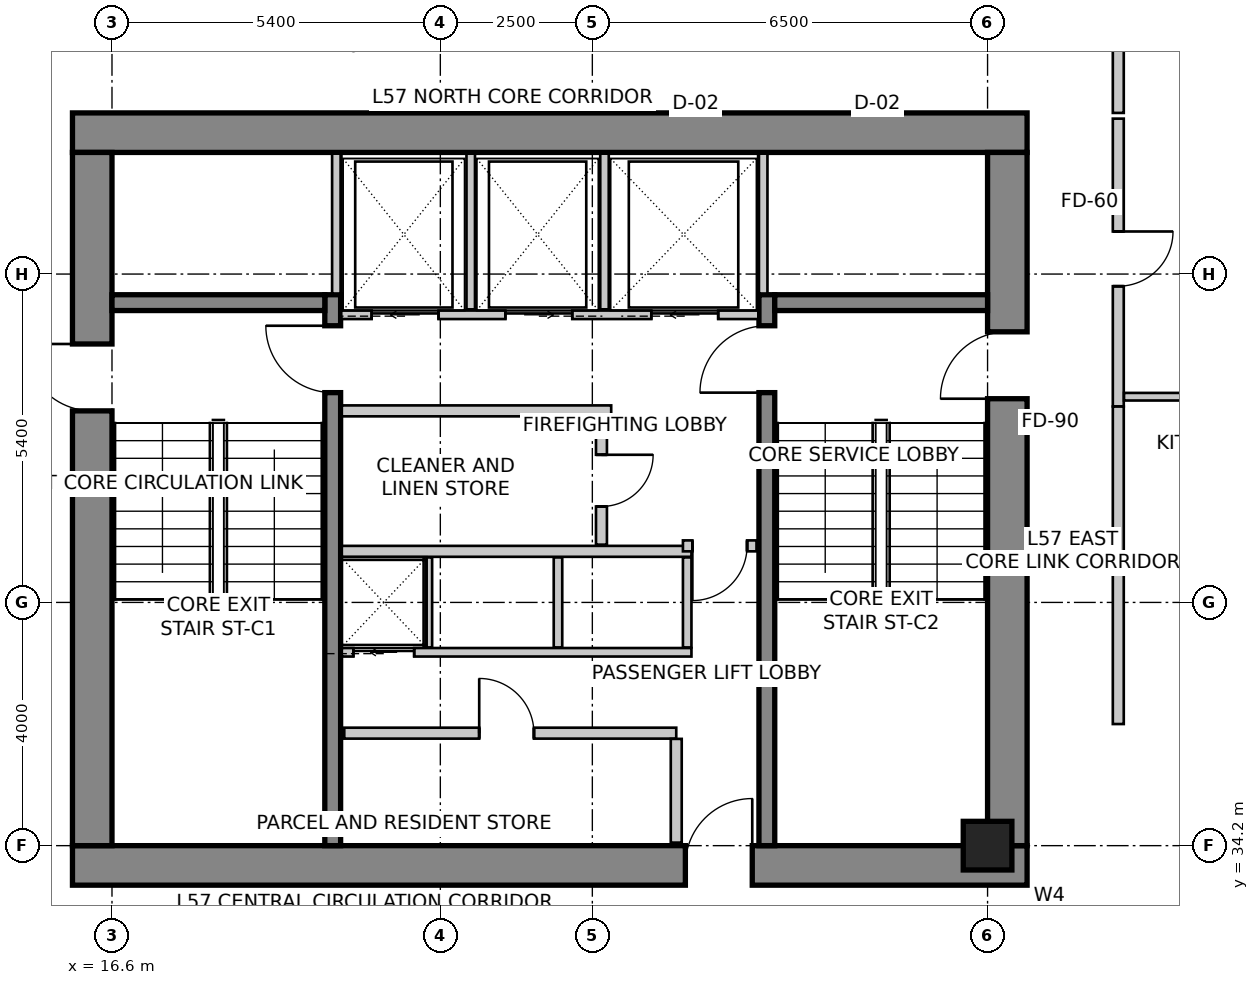
"""IFC4 building model, lengths in metres.
Left out: names, types, materials, properties, quantities, classifications, styles, units other than length and angle.
Written with IfcOpenShell. Run it as: python <this file> out.ifc"""

import sys

from ifc_helpers import new_model, si_unit, direction, frame, frame_2d, origin, origin_2d, place, context, subcontext, project, spatial, rectangle, extrude, source, transform, mapped, element, fill, save


model = new_model("IFC4")
c1 = context("Model", 3, precision=1e-05, world=origin(), true_north=direction((0.0, 1.0)))
c2 = subcontext(c1, "Body", "Model", "MODEL_VIEW")
j1 = project(units=[si_unit("LENGTHUNIT", "METRE"), si_unit("PLANEANGLEUNIT", "RADIAN")], contexts=[c1])
p1 = place(None, origin())
s1 = spatial("IfcSite", under=j1, at=p1, CompositionType="ELEMENT")
p2 = place(p1, origin())
s2 = spatial("IfcBuilding", under=s1, at=p2, CompositionType="ELEMENT")
p3 = place(p2, frame((0.0, 0.0, 225.4)))
s3 = spatial("IfcBuildingStorey", under=s2, at=p3, CompositionType="ELEMENT", Elevation=225.4)
p4 = place(p3, frame((15.95, 45.925, 0.0), z_axis=(0.0, 0.0, 1.0), x_axis=(1.0, 0.0, 0.0)))
e1 = element("IfcWall", 1, at=p4, inside=s3, PredefinedType="SHEAR", context=c2, shape_type="SweptSolid", body=[
    extrude(rectangle(XDim=15.7, YDim=0.65, at=frame_2d((7.85, 0.0))), origin(), (0.0, 0.0, 1.0), 3.5),
])
p5 = place(p3, frame((15.95, 33.875, 0.0), z_axis=(0.0, 0.0, 1.0), x_axis=(1.0, 0.0, 0.0)))
e2 = element("IfcWall", 2, at=p5, inside=s3, PredefinedType="SHEAR", context=c2, shape_type="SweptSolid", body=[
    extrude(rectangle(XDim=15.7, YDim=0.65, at=frame_2d((7.85, 0.0))), origin(), (0.0, 0.0, 1.0), 3.5),
])
m1 = source(origin(), c2, "Body", "SweptSolid", [
    extrude(rectangle(XDim=1.1, YDim=2.15, at=frame_2d((0.55, 1.075))), frame((0.0, 0.335, 0.0), z_axis=(0.0, -1.0, 0.0), x_axis=(1.0, 0.0, 0.0)), (0.0, 0.0, 1.0), 0.67),
])
p6 = place(p5, frame((10.08, 0.0, 0.0)))
e3 = element("IfcOpeningElement", 3, at=p6, cuts=e2, PredefinedType="OPENING", context=c2, shape_type="MappedRepresentation", body=[
    mapped(m1, transform((0.0, 0.0, 0.0), scale=1.0)),
])
p7 = place(p3, frame((16.275, 34.2, 0.0), z_axis=(0.0, 0.0, 1.0), x_axis=(0.0, 1.0, 0.0)))
e4 = element("IfcWall", 4, at=p7, inside=s3, PredefinedType="SHEAR", context=c2, shape_type="SweptSolid", body=[
    extrude(rectangle(XDim=11.4, YDim=0.65, at=frame_2d((5.7, 0.0))), origin(), (0.0, 0.0, 1.0), 3.5),
])
p8 = place(p7, frame((7.15, 0.0, 0.0)))
e5 = element("IfcOpeningElement", 5, at=p8, cuts=e4, PredefinedType="OPENING", context=c2, shape_type="MappedRepresentation", body=[
    mapped(m1, transform((0.0, 0.0, 0.0), scale=1.0)),
])
p9 = place(p3, frame((31.325, 34.2, 0.0), z_axis=(0.0, 0.0, 1.0), x_axis=(0.0, 1.0, 0.0)))
e6 = element("IfcWall", 6, at=p9, inside=s3, PredefinedType="SHEAR", context=c2, shape_type="SweptSolid", body=[
    extrude(rectangle(XDim=11.4, YDim=0.65, at=frame_2d((5.7, 0.0))), origin(), (0.0, 0.0, 1.0), 3.5),
])
p10 = place(p9, frame((7.35, 0.0, 0.0)))
e7 = element("IfcOpeningElement", 7, at=p10, cuts=e6, PredefinedType="OPENING", context=c2, shape_type="MappedRepresentation", body=[
    mapped(m1, transform((0.0, 0.0, 0.0), scale=1.0)),
])
p11 = place(p3, frame((20.23, 34.2, 0.0), z_axis=(0.0, 0.0, 1.0), x_axis=(0.0, 1.0, 0.0)))
e8 = element("IfcWall", 8, at=p11, inside=s3, PredefinedType="SHEAR", context=c2, shape_type="SweptSolid", body=[
    extrude(rectangle(XDim=9.06, YDim=0.26, at=frame_2d((4.53, 0.0))), origin(), (0.0, 0.0, 1.0), 3.5),
])
m2 = source(origin(), c2, "Body", "SweptSolid", [
    extrude(rectangle(XDim=1.1, YDim=2.15, at=frame_2d((0.55, 1.075))), frame((0.0, 0.14, 0.0), z_axis=(0.0, -1.0, 0.0), x_axis=(1.0, 0.0, 0.0)), (0.0, 0.0, 1.0), 0.28),
])
p12 = place(p11, frame((7.45, 0.0, 0.0)))
e9 = element("IfcOpeningElement", 9, at=p12, cuts=e8, PredefinedType="OPENING", context=c2, shape_type="MappedRepresentation", body=[
    mapped(m2, transform((0.0, 0.0, 0.0), scale=1.0)),
])
p13 = place(p3, frame((27.37, 34.2, 0.0), z_axis=(0.0, 0.0, 1.0), x_axis=(0.0, 1.0, 0.0)))
e10 = element("IfcWall", 10, at=p13, inside=s3, PredefinedType="SHEAR", context=c2, shape_type="SweptSolid", body=[
    extrude(rectangle(XDim=9.06, YDim=0.26, at=frame_2d((4.53, 0.0))), origin(), (0.0, 0.0, 1.0), 3.5),
])
p14 = place(p13, frame((7.45, 0.0, 0.0)))
e11 = element("IfcOpeningElement", 11, at=p14, cuts=e10, PredefinedType="OPENING", context=c2, shape_type="MappedRepresentation", body=[
    mapped(m2, transform((0.0, 0.0, 0.0), scale=1.0)),
])
for number, where, z_axis, x_axis in (
    (12, (16.6, 43.13, 0.0), (0.0, 0.0, 1.0), (1.0, 0.0, 0.0)),
    (13, (27.5, 43.13, 0.0), (0.0, 0.0, 1.0), (1.0, 0.0, 0.0)),
):
    element("IfcWall", number, at=place(p3, frame(where, z_axis=z_axis, x_axis=x_axis)), inside=s3, PredefinedType="SHEAR", context=c2, shape_type="SweptSolid", body=[
        extrude(rectangle(XDim=3.5, YDim=0.26, at=frame_2d((1.75, 0.0))), origin(), (0.0, 0.0, 1.0), 3.5),
    ])
m3 = source(origin(), c2, "Body", "SweptSolid", [
    extrude(rectangle(XDim=0.8, YDim=0.8, at=origin_2d()), origin(), (0.0, 0.0, 1.0), 3.5),
])
p15 = place(p3, frame((31.0, 34.2, 0.0), z_axis=(0.0, 0.0, 1.0), x_axis=(1.0, 0.0, 0.0)))
e14 = element("IfcColumn", 14, at=p15, inside=s3, PredefinedType="COLUMN", context=c2, shape_type="MappedRepresentation", body=[
    mapped(m3, transform((0.0, 0.0, 0.0), scale=1.0)),
])
p16 = place(p3, frame((21.874, 52.742, 0.0), z_axis=(0.0, 0.0, 1.0), x_axis=(-0.84365659959, -0.536883173482, 0.0)))
e15 = element("IfcWall", 15, at=p16, inside=s3, PredefinedType="SOLIDWALL", context=c2, shape_type="SweptSolid", body=[
    extrude(rectangle(XDim=10.283, YDim=0.3, at=frame_2d((5.142, 0.0))), origin(), (0.0, 0.0, 1.0), 3.25),
])
m4 = source(origin(), c2, "Body", "SweptSolid", [
    extrude(rectangle(XDim=2.4, YDim=2.2, at=frame_2d((1.2, 1.1))), frame((0.0, 0.16, 0.0), z_axis=(0.0, -1.0, 0.0), x_axis=(1.0, 0.0, 0.0)), (0.0, 0.0, 1.0), 0.32),
])
p17 = place(p16, frame((3.307, 0.0, 0.85)))
e16 = element("IfcOpeningElement", 16, at=p17, cuts=e15, PredefinedType="OPENING", context=c2, shape_type="MappedRepresentation", body=[
    mapped(m4, transform((0.0, 0.0, 0.0), scale=1.0)),
])
p18 = place(p3, frame((20.37, 42.93, 0.0), z_axis=(0.0, 0.0, 1.0), x_axis=(1.0, 0.0, 0.0)))
e17 = element("IfcWall", 17, at=p18, inside=s3, PredefinedType="SOLIDWALL", context=c2, shape_type="SweptSolid", body=[
    extrude(rectangle(XDim=6.86, YDim=0.14, at=frame_2d((3.43, 0.0))), origin(), (0.0, 0.0, 1.0), 3.25),
])
m5 = source(origin(), c2, "Body", "SweptSolid", [
    extrude(rectangle(XDim=1.1, YDim=2.15, at=frame_2d((0.55, 1.075))), frame((0.0, 0.08, 0.0), z_axis=(0.0, -1.0, 0.0), x_axis=(1.0, 0.0, 0.0)), (0.0, 0.0, 1.0), 0.16),
])
p19 = place(p18, frame((0.5, 0.0, 0.0)))
e18 = element("IfcOpeningElement", 18, at=p19, cuts=e17, PredefinedType="OPENING", context=c2, shape_type="MappedRepresentation", body=[
    mapped(m5, transform((0.0, 0.0, 0.0), scale=1.0)),
])
p20 = place(p18, frame((2.7, 0.0, 0.0)))
e19 = element("IfcOpeningElement", 19, at=p20, cuts=e17, PredefinedType="OPENING", context=c2, shape_type="MappedRepresentation", body=[
    mapped(m5, transform((0.0, 0.0, 0.0), scale=1.0)),
])
p21 = place(p18, frame((5.1, 0.0, 0.0)))
e20 = element("IfcOpeningElement", 20, at=p21, cuts=e17, PredefinedType="OPENING", context=c2, shape_type="MappedRepresentation", body=[
    mapped(m5, transform((0.0, 0.0, 0.0), scale=1.0)),
])
for number, where, z_axis, x_axis in (
    (21, (20.29, 43.28, 0.0), (0.0, 0.0, 1.0), (0.0, 1.0, 0.0)),
    (22, (27.31, 43.28, 0.0), (0.0, 0.0, 1.0), (0.0, 1.0, 0.0)),
):
    element("IfcWall", number, at=place(p3, frame(where, z_axis=z_axis, x_axis=x_axis)), inside=s3, PredefinedType="SOLIDWALL", context=c2, shape_type="SweptSolid", body=[
        extrude(rectangle(XDim=2.3, YDim=0.14, at=frame_2d((1.15, 0.0))), origin(), (0.0, 0.0, 1.0), 3.25),
    ])
for number, where, z_axis, x_axis in (
    (23, (22.5, 43.02, 0.0), (0.0, 0.0, 1.0), (0.0, 1.0, 0.0)),
    (24, (24.7, 43.02, 0.0), (0.0, 0.0, 1.0), (0.0, 1.0, 0.0)),
):
    element("IfcWall", number, at=place(p3, frame(where, z_axis=z_axis, x_axis=x_axis)), inside=s3, PredefinedType="SOLIDWALL", context=c2, shape_type="SweptSolid", body=[
        extrude(rectangle(XDim=2.56, YDim=0.14, at=frame_2d((1.28, 0.0))), origin(), (0.0, 0.0, 1.0), 3.25),
    ])
p22 = place(p3, frame((20.38, 37.38, 0.0), z_axis=(0.0, 0.0, 1.0), x_axis=(1.0, 0.0, 0.0)))
e25 = element("IfcWall", 25, at=p22, inside=s3, PredefinedType="SOLIDWALL", context=c2, shape_type="SweptSolid", body=[
    extrude(rectangle(XDim=5.75, YDim=0.14, at=frame_2d((2.875, 0.0))), origin(), (0.0, 0.0, 1.0), 3.25),
])
m6 = source(origin(), c2, "Body", "SweptSolid", [
    extrude(rectangle(XDim=1.0, YDim=2.15, at=frame_2d((0.5, 1.075))), frame((0.0, 0.08, 0.0), z_axis=(0.0, -1.0, 0.0), x_axis=(1.0, 0.0, 0.0)), (0.0, 0.0, 1.0), 0.16),
])
p23 = place(p22, frame((0.19, 0.0, 0.0)))
e26 = element("IfcOpeningElement", 26, at=p23, cuts=e25, PredefinedType="OPENING", context=c2, shape_type="MappedRepresentation", body=[
    mapped(m6, transform((0.0, 0.0, 0.0), scale=1.0)),
])
p24 = place(p3, frame((20.38, 39.04, 0.0), z_axis=(0.0, 0.0, 1.0), x_axis=(1.0, 0.0, 0.0)))
e27 = element("IfcWall", 27, at=p24, inside=s3, PredefinedType="SOLIDWALL", context=c2, shape_type="SweptSolid", body=[
    extrude(rectangle(XDim=5.75, YDim=0.18, at=frame_2d((2.875, 0.0))), origin(), (0.0, 0.0, 1.0), 3.25),
])
for number, where, z_axis, x_axis in (
    (28, (26.06, 37.46, 0.0), (0.0, 0.0, 1.0), (0.0, 1.0, 0.0)),
    (29, (21.795, 37.46, 0.0), (0.0, 0.0, 1.0), (0.0, 1.0, 0.0)),
    (30, (23.935, 37.46, 0.0), (0.0, 0.0, 1.0), (0.0, 1.0, 0.0)),
):
    element("IfcWall", number, at=place(p3, frame(where, z_axis=z_axis, x_axis=x_axis)), inside=s3, PredefinedType="SOLIDWALL", context=c2, shape_type="SweptSolid", body=[
        extrude(rectangle(XDim=1.48, YDim=0.14, at=frame_2d((0.74, 0.0))), origin(), (0.0, 0.0, 1.0), 3.25),
    ])
p25 = place(p3, frame((24.81, 41.35, 0.0), z_axis=(0.0, 0.0, 1.0), x_axis=(-1.0, 0.0, 0.0)))
e31 = element("IfcWall", 31, at=p25, inside=s3, PredefinedType="PARTITIONING", context=c2, shape_type="SweptSolid", body=[
    extrude(rectangle(XDim=4.43, YDim=0.18, at=frame_2d((2.215, 0.0))), origin(), (0.0, 0.0, 1.0), 3.25),
])
p26 = place(p3, frame((24.65, 41.256, 0.0), z_axis=(0.0, 0.0, 1.0), x_axis=(0.0, -1.0, 0.0)))
e32 = element("IfcWall", 32, at=p26, inside=s3, PredefinedType="PARTITIONING", context=c2, shape_type="SweptSolid", body=[
    extrude(rectangle(XDim=2.106, YDim=0.18, at=frame_2d((1.053, 0.0))), origin(), (0.0, 0.0, 1.0), 3.25),
])
m7 = source(origin(), c2, "Body", "SweptSolid", [
    extrude(rectangle(XDim=0.85, YDim=2.15, at=frame_2d((0.425, 1.075))), frame((0.0, 0.1, 0.0), z_axis=(0.0, -1.0, 0.0), x_axis=(1.0, 0.0, 0.0)), (0.0, 0.0, 1.0), 0.2),
])
p27 = place(p26, frame((0.628, 0.0, 0.0)))
e33 = element("IfcOpeningElement", 33, at=p27, cuts=e32, PredefinedType="OPENING", context=c2, shape_type="MappedRepresentation", body=[
    mapped(m7, transform((0.0, 0.0, 0.0), scale=1.0)),
])
p28 = place(p3, frame((27.2, 39.13, 0.0), z_axis=(0.0, 0.0, 1.0), x_axis=(-1.0, 0.0, 0.0)))
e34 = element("IfcWall", 34, at=p28, inside=s3, PredefinedType="PARTITIONING", context=c2, shape_type="SweptSolid", body=[
    extrude(rectangle(XDim=1.21, YDim=0.18, at=frame_2d((0.605, 0.0))), origin(), (0.0, 0.0, 1.0), 3.25),
])
m8 = source(origin(), c2, "Body", "SweptSolid", [
    extrude(rectangle(XDim=0.9, YDim=2.15, at=frame_2d((0.45, 1.075))), frame((0.0, 0.1, 0.0), z_axis=(0.0, -1.0, 0.0), x_axis=(1.0, 0.0, 0.0)), (0.0, 0.0, 1.0), 0.2),
])
p29 = place(p28, frame((0.155, 0.0, 0.0)))
e35 = element("IfcOpeningElement", 35, at=p29, cuts=e34, PredefinedType="OPENING", context=c2, shape_type="MappedRepresentation", body=[
    mapped(m8, transform((0.0, 0.0, 0.0), scale=1.0)),
])
p30 = place(p3, frame((20.42, 36.05, 0.0), z_axis=(0.0, 0.0, 1.0), x_axis=(1.0, 0.0, 0.0)))
e36 = element("IfcWall", 36, at=p30, inside=s3, PredefinedType="PARTITIONING", context=c2, shape_type="SweptSolid", body=[
    extrude(rectangle(XDim=5.46, YDim=0.18, at=frame_2d((2.73, 0.0))), origin(), (0.0, 0.0, 1.0), 3.25),
])
p31 = place(p30, frame((2.219, 0.0, 0.0)))
e37 = element("IfcOpeningElement", 37, at=p31, cuts=e36, PredefinedType="OPENING", context=c2, shape_type="MappedRepresentation", body=[
    mapped(m8, transform((0.0, 0.0, 0.0), scale=1.0)),
])
p32 = place(p3, frame((25.88, 35.956, 0.0), z_axis=(0.0, 0.0, 1.0), x_axis=(0.0, -1.0, 0.0)))
e38 = element("IfcWall", 38, at=p32, inside=s3, PredefinedType="PARTITIONING", context=c2, shape_type="SweptSolid", body=[
    extrude(rectangle(XDim=1.706, YDim=0.18, at=frame_2d((0.853, 0.0))), origin(), (0.0, 0.0, 1.0), 2.542),
])
p33 = place(p3, frame((33.15, 47.706, 0.0), z_axis=(0.0, 0.0, 1.0), x_axis=(0.0, -1.0, 0.0)))
e39 = element("IfcWall", 39, at=p33, inside=s3, PredefinedType="PARTITIONING", context=c2, shape_type="SweptSolid", body=[
    extrude(rectangle(XDim=1.456, YDim=0.18, at=frame_2d((0.728, 0.0))), origin(), (0.0, 0.0, 1.0), 2.835),
])
p34 = place(p3, frame((33.15, 38.948, 0.0), z_axis=(0.0, 0.0, 1.0), x_axis=(0.0, -1.0, 0.0)))
e40 = element("IfcWall", 40, at=p34, inside=s3, PredefinedType="PARTITIONING", context=c2, shape_type="SweptSolid", body=[
    extrude(rectangle(XDim=2.748, YDim=0.18, at=frame_2d((1.374, 0.0))), origin(), (0.0, 0.0, 1.0), 3.25),
])
p35 = place(p3, frame((33.15, 46.156, 0.0), z_axis=(0.0, 0.0, 1.0), x_axis=(0.0, -1.0, 0.0)))
e41 = element("IfcWall", 41, at=p35, inside=s3, PredefinedType="PARTITIONING", context=c2, shape_type="SweptSolid", body=[
    extrude(rectangle(XDim=4.733, YDim=0.18, at=frame_2d((2.366, 0.0))), origin(), (0.0, 0.0, 1.0), 2.688),
])
p36 = place(p35, frame((1.856, 0.0, 0.0)))
e42 = element("IfcOpeningElement", 42, at=p36, cuts=e41, PredefinedType="OPENING", context=c2, shape_type="MappedRepresentation", body=[
    mapped(m8, transform((0.0, 0.0, 0.0), scale=1.0)),
])
p37 = place(p3, frame((33.15, 41.421, 0.0), z_axis=(0.0, 0.0, 1.0), x_axis=(0.0, -1.0, 0.0)))
e43 = element("IfcWall", 43, at=p37, inside=s3, PredefinedType="PARTITIONING", context=c2, shape_type="SweptSolid", body=[
    extrude(rectangle(XDim=2.471, YDim=0.18, at=frame_2d((1.235, 0.0))), origin(), (0.0, 0.0, 1.0), 3.25),
])
p38 = place(p3, frame((33.244, 38.788, 0.0), z_axis=(0.0, 0.0, 1.0), x_axis=(1.0, 0.0, 0.0)))
e44 = element("IfcWall", 44, at=p38, inside=s3, PredefinedType="PARTITIONING", context=c2, shape_type="SweptSolid", body=[
    extrude(rectangle(XDim=6.346, YDim=0.125, at=frame_2d((3.173, 0.0))), origin(), (0.0, 0.0, 1.0), 2.766),
])
m9 = source(origin(), c2, "Body", "SweptSolid", [
    extrude(rectangle(XDim=0.9, YDim=2.15, at=frame_2d((0.45, 1.075))), frame((0.0, 0.073, 0.0), z_axis=(0.0, -1.0, 0.0), x_axis=(1.0, 0.0, 0.0)), (0.0, 0.0, 1.0), 0.145),
])
p39 = place(p38, frame((2.723, 0.0, 0.0)))
e45 = element("IfcOpeningElement", 45, at=p39, cuts=e44, PredefinedType="OPENING", context=c2, shape_type="MappedRepresentation", body=[
    mapped(m9, transform((0.0, 0.0, 0.0), scale=1.0)),
])
p40 = place(p3, frame((39.59, 41.583, 0.0), z_axis=(0.0, 0.0, 1.0), x_axis=(-1.0, 0.0, 0.0)))
e46 = element("IfcWall", 46, at=p40, inside=s3, PredefinedType="PARTITIONING", context=c2, shape_type="SweptSolid", body=[
    extrude(rectangle(XDim=6.346, YDim=0.125, at=frame_2d((3.173, 0.0))), origin(), (0.0, 0.0, 1.0), 2.766),
])
m10 = source(origin(), c2, "Body", "SweptSolid", [
    extrude(rectangle(XDim=0.85, YDim=2.15, at=frame_2d((0.425, 1.075))), frame((0.0, 0.073, 0.0), z_axis=(0.0, -1.0, 0.0), x_axis=(1.0, 0.0, 0.0)), (0.0, 0.0, 1.0), 0.145),
])
p41 = place(p40, frame((2.688, 0.0, 0.0)))
e47 = element("IfcOpeningElement", 47, at=p41, cuts=e46, PredefinedType="OPENING", context=c2, shape_type="MappedRepresentation", body=[
    mapped(m10, transform((0.0, 0.0, 0.0), scale=1.0)),
])
m11 = source(origin(), c2, "Body", "SweptSolid", [
    extrude(rectangle(XDim=1.1, YDim=2.15, at=frame_2d((0.55, 1.075))), frame((0.0, 0.025, 0.0), z_axis=(0.0, -1.0, 0.0), x_axis=(1.0, 0.0, 0.0)), (0.0, 0.0, 1.0), 0.05),
])
p42 = place(p19, origin())
e48 = element("IfcDoor", 48, at=p42, inside=s3, OperationType="SLIDING_TO_LEFT", PredefinedType="DOOR", context=c2, shape_type="MappedRepresentation", body=[
    mapped(m11, transform((0.0, 0.0, 0.0), scale=1.0)),
])
fill(e18, e48)
p43 = place(p20, origin())
e49 = element("IfcDoor", 49, at=p43, inside=s3, OperationType="SLIDING_TO_RIGHT", PredefinedType="DOOR", context=c2, shape_type="MappedRepresentation", body=[
    mapped(m11, transform((0.0, 0.0, 0.0), scale=1.0)),
])
fill(e19, e49)
m12 = source(origin(), c2, "Body", "SweptSolid", [
    extrude(rectangle(XDim=1.1, YDim=2.15, at=frame_2d((0.55, 1.075))), frame((0.0, 0.025, 0.0), z_axis=(0.0, -1.0, 0.0), x_axis=(1.0, 0.0, 0.0)), (0.0, 0.0, 1.0), 0.05),
])
p44 = place(p21, origin())
e50 = element("IfcDoor", 50, at=p44, inside=s3, OperationType="SLIDING_TO_LEFT", PredefinedType="DOOR", context=c2, shape_type="MappedRepresentation", body=[
    mapped(m12, transform((0.0, 0.0, 0.0), scale=1.0)),
])
fill(e20, e50)
m13 = source(origin(), c2, "Body", "SweptSolid", [
    extrude(rectangle(XDim=1.0, YDim=2.15, at=frame_2d((0.5, 1.075))), frame((0.0, 0.025, 0.0), z_axis=(0.0, -1.0, 0.0), x_axis=(1.0, 0.0, 0.0)), (0.0, 0.0, 1.0), 0.05),
])
p45 = place(p23, origin())
e51 = element("IfcDoor", 51, at=p45, inside=s3, OperationType="SLIDING_TO_LEFT", PredefinedType="DOOR", context=c2, shape_type="MappedRepresentation", body=[
    mapped(m13, transform((0.0, 0.0, 0.0), scale=1.0)),
])
fill(e26, e51)
m14 = source(origin(), c2, "Body", "SweptSolid", [
    extrude(rectangle(XDim=1.1, YDim=2.15, at=frame_2d((0.55, 1.075))), frame((0.0, 0.025, 0.0), z_axis=(0.0, -1.0, 0.0), x_axis=(1.0, 0.0, 0.0)), (0.0, 0.0, 1.0), 0.05),
])
p46 = place(p12, origin())
e52 = element("IfcDoor", 52, at=p46, inside=s3, OperationType="SINGLE_SWING_RIGHT", PredefinedType="DOOR", context=c2, shape_type="MappedRepresentation", body=[
    mapped(m14, transform((0.0, 0.0, 0.0), scale=1.0)),
])
fill(e9, e52)
p47 = place(p14, origin())
e53 = element("IfcDoor", 53, at=p47, inside=s3, OperationType="SINGLE_SWING_LEFT", PredefinedType="DOOR", context=c2, shape_type="MappedRepresentation", body=[
    mapped(m14, transform((0.0, 0.0, 0.0), scale=1.0)),
])
fill(e11, e53)
p48 = place(p8, origin())
e54 = element("IfcDoor", 54, at=p48, inside=s3, OperationType="SINGLE_SWING_RIGHT", PredefinedType="DOOR", context=c2, shape_type="MappedRepresentation", body=[
    mapped(m14, transform((0.0, 0.0, 0.0), scale=1.0)),
])
fill(e5, e54)
p49 = place(p10, origin())
e55 = element("IfcDoor", 55, at=p49, inside=s3, OperationType="SINGLE_SWING_LEFT", PredefinedType="DOOR", context=c2, shape_type="MappedRepresentation", body=[
    mapped(m14, transform((0.0, 0.0, 0.0), scale=1.0)),
])
fill(e7, e55)
p50 = place(p6, origin())
e56 = element("IfcDoor", 56, at=p50, inside=s3, OperationType="SINGLE_SWING_RIGHT", PredefinedType="DOOR", context=c2, shape_type="MappedRepresentation", body=[
    mapped(m14, transform((0.0, 0.0, 0.0), scale=1.0)),
])
fill(e3, e56)
m15 = source(origin(), c2, "Body", "SweptSolid", [
    extrude(rectangle(XDim=0.85, YDim=2.15, at=frame_2d((0.425, 1.075))), frame((0.0, 0.025, 0.0), z_axis=(0.0, -1.0, 0.0), x_axis=(1.0, 0.0, 0.0)), (0.0, 0.0, 1.0), 0.05),
])
p51 = place(p27, origin())
e57 = element("IfcDoor", 57, at=p51, inside=s3, OperationType="SINGLE_SWING_LEFT", PredefinedType="DOOR", context=c2, shape_type="MappedRepresentation", body=[
    mapped(m15, transform((0.0, 0.0, 0.0), scale=1.0)),
])
fill(e33, e57)
m16 = source(origin(), c2, "Body", "SweptSolid", [
    extrude(rectangle(XDim=0.9, YDim=2.15, at=frame_2d((0.45, 1.075))), frame((0.0, 0.025, 0.0), z_axis=(0.0, -1.0, 0.0), x_axis=(1.0, 0.0, 0.0)), (0.0, 0.0, 1.0), 0.05),
])
p52 = place(p29, origin())
e58 = element("IfcDoor", 58, at=p52, inside=s3, OperationType="SINGLE_SWING_RIGHT", PredefinedType="DOOR", context=c2, shape_type="MappedRepresentation", body=[
    mapped(m16, transform((0.0, 0.0, 0.0), scale=1.0)),
])
fill(e35, e58)
p53 = place(p31, origin())
e59 = element("IfcDoor", 59, at=p53, inside=s3, OperationType="SINGLE_SWING_LEFT", PredefinedType="DOOR", context=c2, shape_type="MappedRepresentation", body=[
    mapped(m16, transform((0.0, 0.0, 0.0), scale=1.0)),
])
fill(e37, e59)
p54 = place(p36, origin())
e60 = element("IfcDoor", 60, at=p54, inside=s3, OperationType="SINGLE_SWING_LEFT", PredefinedType="DOOR", context=c2, shape_type="MappedRepresentation", body=[
    mapped(m16, transform((0.0, 0.0, 0.0), scale=1.0)),
])
fill(e42, e60)
save(model, sys.argv[1])
